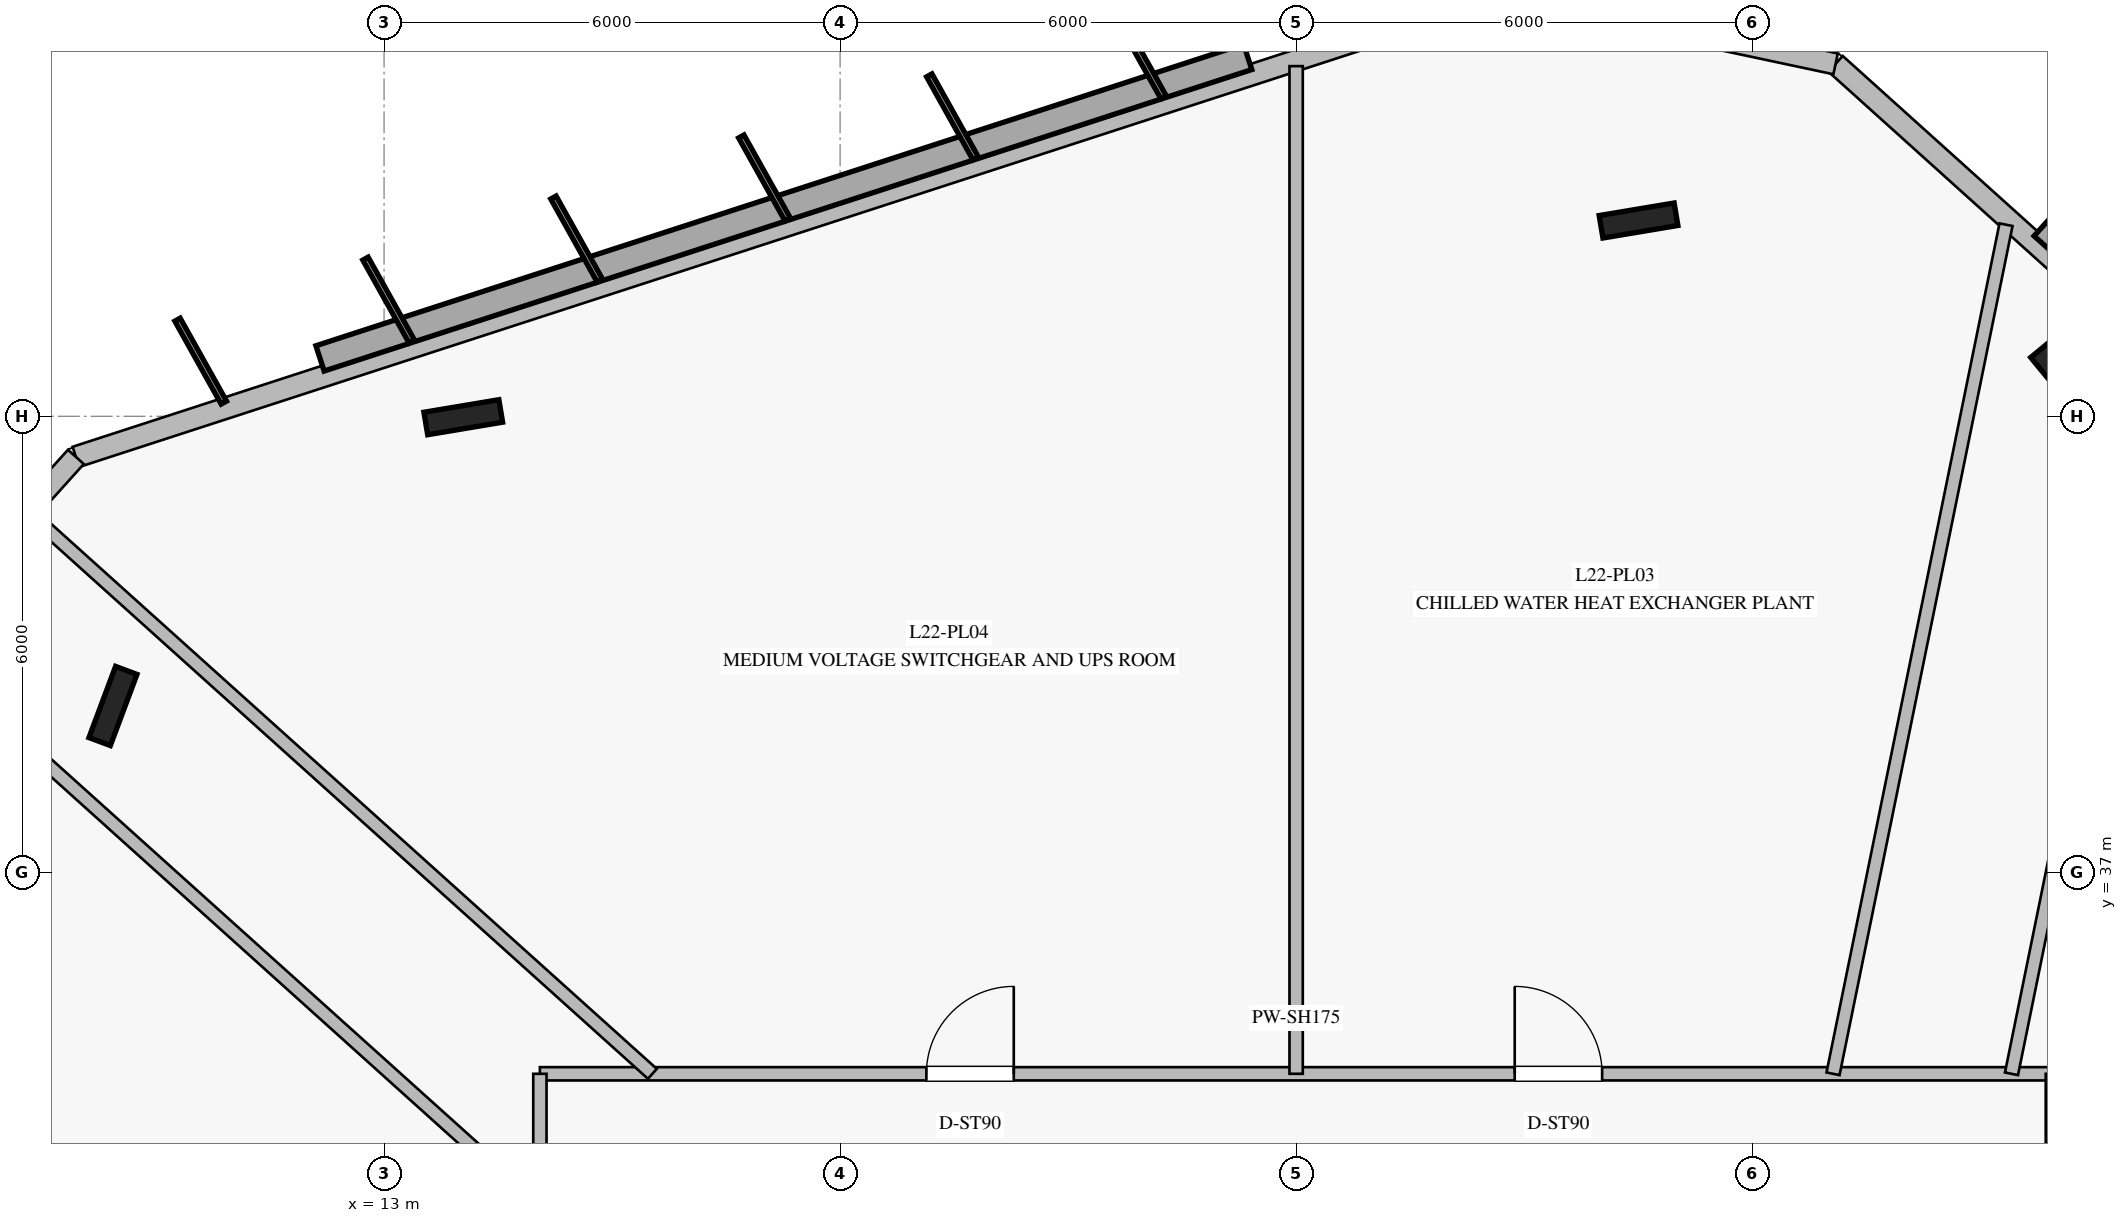
"""IFC4 building model, lengths in metres.
Left out: names, types, materials, properties, quantities, classifications, styles, units other than length and angle.
Written with IfcOpenShell. Run it as: python <this file> out.ifc"""

import sys

from ifc_helpers import new_model, si_unit, direction, frame, frame_2d, origin, origin_2d, place, context, subcontext, project, spatial, rectangle, i_section, extrude, element, fill, save


model = new_model("IFC4")
c1 = context("Model", 3, precision=1e-05, world=origin(), true_north=direction((0.0, 1.0)))
c2 = subcontext(c1, "Body", "Model", "MODEL_VIEW")
j1 = project(units=[si_unit("LENGTHUNIT", "METRE"), si_unit("PLANEANGLEUNIT", "RADIAN")], contexts=[c1])
p1 = place(None, origin())
s1 = spatial("IfcSite", under=j1, at=p1, CompositionType="ELEMENT")
p2 = place(p1, origin())
s2 = spatial("IfcBuilding", under=s1, at=p2, CompositionType="ELEMENT")
p3 = place(p2, frame((0.0, 0.0, 92.0)))
s3 = spatial("IfcBuildingStorey", under=s2, at=p3, CompositionType="ELEMENT", Elevation=92.0)
for number, where, z_axis, x_axis in (
    (1, (35.099, 43.484, 0.0), (0.0, 0.0, 1.0), (-0.636, 0.772, 0.0)),
    (2, (29.505, 45.576, 0.0), (0.0, 0.0, 1.0), (0.986, 0.165, 0.0)),
    (3, (14.042, 42.988, 0.0), (0.0, 0.0, 1.0), (0.986, 0.165, 0.0)),
    (4, (9.433, 39.189, 0.0), (0.0, 0.0, 1.0), (0.35, 0.937, 0.0)),
):
    element("IfcColumn", number, at=place(p3, frame(where, z_axis=z_axis, x_axis=x_axis)), inside=s3, PredefinedType="COLUMN", context=c2, shape_type="SweptSolid", body=[
        extrude(i_section(OverallWidth=0.3, OverallDepth=1.0, WebThickness=0.019, FlangeThickness=0.036, at=origin_2d()), origin(), (0.0, 0.0, 1.0), 5.4),
    ])
p4 = place(p3, frame((46.772, 34.425, 0.0), z_axis=(0.0, 0.0, 1.0), x_axis=(-0.743161948842, 0.669111588446, 0.0)))
e5 = element("IfcWall", 5, at=p4, inside=s3, PredefinedType="STANDARD", context=c2, shape_type="SweptSolid", body=[
    extrude(rectangle(XDim=19.745, YDim=0.28, at=frame_2d((9.873, 0.0))), origin(), (0.0, 0.0, 1.0), 5.14),
])
p5 = place(p3, frame((32.098, 47.637, 0.0), z_axis=(0.0, 0.0, 1.0), x_axis=(-0.978092216597, 0.20817208226, 0.0)))
e6 = element("IfcWall", 6, at=p5, inside=s3, PredefinedType="STANDARD", context=c2, shape_type="SweptSolid", body=[
    extrude(rectangle(XDim=4.473, YDim=0.28, at=frame_2d((2.236, 0.0))), origin(), (0.0, 0.0, 1.0), 5.14),
])
p6 = place(p3, frame((27.723, 48.568, 0.0), z_axis=(0.0, 0.0, 1.0), x_axis=(-0.951045154023, -0.309051961667, 0.0)))
e7 = element("IfcWall", 7, at=p6, inside=s3, PredefinedType="STANDARD", context=c2, shape_type="SweptSolid", body=[
    extrude(rectangle(XDim=19.744, YDim=0.28, at=frame_2d((9.872, 0.0))), origin(), (0.0, 0.0, 1.0), 5.14),
])
p7 = place(p3, frame((8.945, 42.466, 0.0), z_axis=(0.0, 0.0, 1.0), x_axis=(-0.669281253692, -0.743009154356, 0.0)))
e8 = element("IfcWall", 8, at=p7, inside=s3, PredefinedType="STANDARD", context=c2, shape_type="SweptSolid", body=[
    extrude(rectangle(XDim=4.474, YDim=0.28, at=frame_2d((2.237, 0.0))), origin(), (0.0, 0.0, 1.0), 5.14),
])
p8 = place(p3, frame((15.05, 34.35, 0.0), z_axis=(0.0, 0.0, 1.0), x_axis=(1.0, 0.0, 0.0)))
e9 = element("IfcWall", 9, at=p8, inside=s3, PredefinedType="PARTITIONING", context=c2, shape_type="SweptSolid", body=[
    extrude(rectangle(XDim=19.9, YDim=0.175, at=frame_2d((9.95, 0.0))), origin(), (0.0, 0.0, 1.0), 3.54),
])
p9 = place(p8, frame((12.826, 0.0, 0.0)))
e10 = element("IfcOpeningElement", 10, at=p9, cuts=e9, PredefinedType="OPENING", context=c2, shape_type="SweptSolid", body=[
    extrude(rectangle(XDim=1.15, YDim=2.2, at=frame_2d((0.575, 1.1))), frame((0.0, 0.098, 0.0), z_axis=(0.0, -1.0, 0.0), x_axis=(1.0, 0.0, 0.0)), (0.0, 0.0, 1.0), 0.195),
])
p10 = place(p8, frame((5.085, 0.0, 0.0)))
e11 = element("IfcOpeningElement", 11, at=p10, cuts=e9, PredefinedType="OPENING", context=c2, shape_type="SweptSolid", body=[
    extrude(rectangle(XDim=1.15, YDim=2.2, at=frame_2d((0.575, 1.1))), frame((0.0, 0.098, 0.0), z_axis=(0.0, -1.0, 0.0), x_axis=(1.0, 0.0, 0.0)), (0.0, 0.0, 1.0), 0.195),
])
p11 = place(p3, frame((34.95, 34.35, 0.0), z_axis=(0.0, 0.0, 1.0), x_axis=(0.0, -1.0, 0.0)))
e12 = element("IfcWall", 12, at=p11, inside=s3, PredefinedType="PARTITIONING", context=c2, shape_type="SweptSolid", body=[
    extrude(rectangle(XDim=18.7, YDim=0.175, at=frame_2d((9.35, 0.0))), origin(), (0.0, 0.0, 1.0), 3.54),
])
p12 = place(p11, frame((8.013, 0.0, 0.0)))
e13 = element("IfcOpeningElement", 13, at=p12, cuts=e12, PredefinedType="OPENING", context=c2, shape_type="SweptSolid", body=[
    extrude(rectangle(XDim=1.15, YDim=2.2, at=frame_2d((0.575, 1.1))), frame((0.0, 0.098, 0.0), z_axis=(0.0, -1.0, 0.0), x_axis=(1.0, 0.0, 0.0)), (0.0, 0.0, 1.0), 0.195),
])
p13 = place(p3, frame((15.05, 15.65, 0.0), z_axis=(0.0, 0.0, 1.0), x_axis=(0.0, 1.0, 0.0)))
e14 = element("IfcWall", 14, at=p13, inside=s3, PredefinedType="PARTITIONING", context=c2, shape_type="SweptSolid", body=[
    extrude(rectangle(XDim=18.7, YDim=0.175, at=frame_2d((9.35, 0.0))), origin(), (0.0, 0.0, 1.0), 3.54),
])
p14 = place(p13, frame((8.191, 0.0, 0.0)))
e15 = element("IfcOpeningElement", 15, at=p14, cuts=e14, PredefinedType="OPENING", context=c2, shape_type="SweptSolid", body=[
    extrude(rectangle(XDim=1.15, YDim=2.2, at=frame_2d((0.575, 1.1))), frame((0.0, 0.098, 0.0), z_axis=(0.0, -1.0, 0.0), x_axis=(1.0, 0.0, 0.0)), (0.0, 0.0, 1.0), 0.195),
])
p15 = place(p3, frame((34.412, 34.35, 0.0), z_axis=(0.0, 0.0, 1.0), x_axis=(0.199614906569, 0.979874425156, 0.0)))
e16 = element("IfcWall", 16, at=p15, inside=s3, PredefinedType="PARTITIONING", context=c2, shape_type="SweptSolid", body=[
    extrude(rectangle(XDim=9.578, YDim=0.175, at=frame_2d((4.789, 0.0))), origin(), (0.0, 0.0, 1.0), 3.53),
])
p16 = place(p3, frame((32.064, 34.35, 0.0), z_axis=(0.0, 0.0, 1.0), x_axis=(0.199652459502, 0.979866774319, 0.0)))
e17 = element("IfcWall", 17, at=p16, inside=s3, PredefinedType="PARTITIONING", context=c2, shape_type="SweptSolid", body=[
    extrude(rectangle(XDim=11.4, YDim=0.175, at=frame_2d((5.7, 0.0))), origin(), (0.0, 0.0, 1.0), 3.53),
])
p17 = place(p3, frame((16.53, 34.35, 0.0), z_axis=(0.0, 0.0, 1.0), x_axis=(-0.743388992032, 0.66885933239, 0.0)))
e18 = element("IfcWall", 18, at=p17, inside=s3, PredefinedType="PARTITIONING", context=c2, shape_type="SweptSolid", body=[
    extrude(rectangle(XDim=11.007, YDim=0.175, at=frame_2d((5.503, 0.0))), origin(), (0.0, 0.0, 1.0), 3.53),
])
p18 = place(p3, frame((15.05, 32.588, 0.0), z_axis=(0.0, 0.0, 1.0), x_axis=(-0.743376269503, 0.668873472295, 0.0)))
e19 = element("IfcWall", 19, at=p18, inside=s3, PredefinedType="PARTITIONING", context=c2, shape_type="SweptSolid", body=[
    extrude(rectangle(XDim=11.086, YDim=0.175, at=frame_2d((5.543, 0.0))), origin(), (0.0, 0.0, 1.0), 3.53),
])
p19 = place(p3, frame((25.0, 34.35, 0.0), z_axis=(0.0, 0.0, 1.0), x_axis=(0.0, 1.0, 0.0)))
e20 = element("IfcWall", 20, at=p19, inside=s3, PredefinedType="PARTITIONING", context=c2, shape_type="SweptSolid", body=[
    extrude(rectangle(XDim=13.257, YDim=0.175, at=frame_2d((6.628, 0.0))), origin(), (0.0, 0.0, 1.0), 3.53),
])
p20 = place(p9, origin())
e21 = element("IfcDoor", 21, at=p20, inside=s3, OperationType="SINGLE_SWING_LEFT", PredefinedType="DOOR", context=c2, shape_type="SweptSolid", body=[
    extrude(rectangle(XDim=1.15, YDim=2.2, at=frame_2d((0.575, 1.1))), frame((0.0, 0.025, 0.0), z_axis=(0.0, -1.0, 0.0), x_axis=(1.0, 0.0, 0.0)), (0.0, 0.0, 1.0), 0.05),
])
fill(e10, e21)
p21 = place(p10, origin())
e22 = element("IfcDoor", 22, at=p21, inside=s3, OperationType="SINGLE_SWING_RIGHT", PredefinedType="DOOR", context=c2, shape_type="SweptSolid", body=[
    extrude(rectangle(XDim=1.15, YDim=2.2, at=frame_2d((0.575, 1.1))), frame((0.0, 0.025, 0.0), z_axis=(0.0, -1.0, 0.0), x_axis=(1.0, 0.0, 0.0)), (0.0, 0.0, 1.0), 0.05),
])
fill(e11, e22)
save(model, sys.argv[1])
